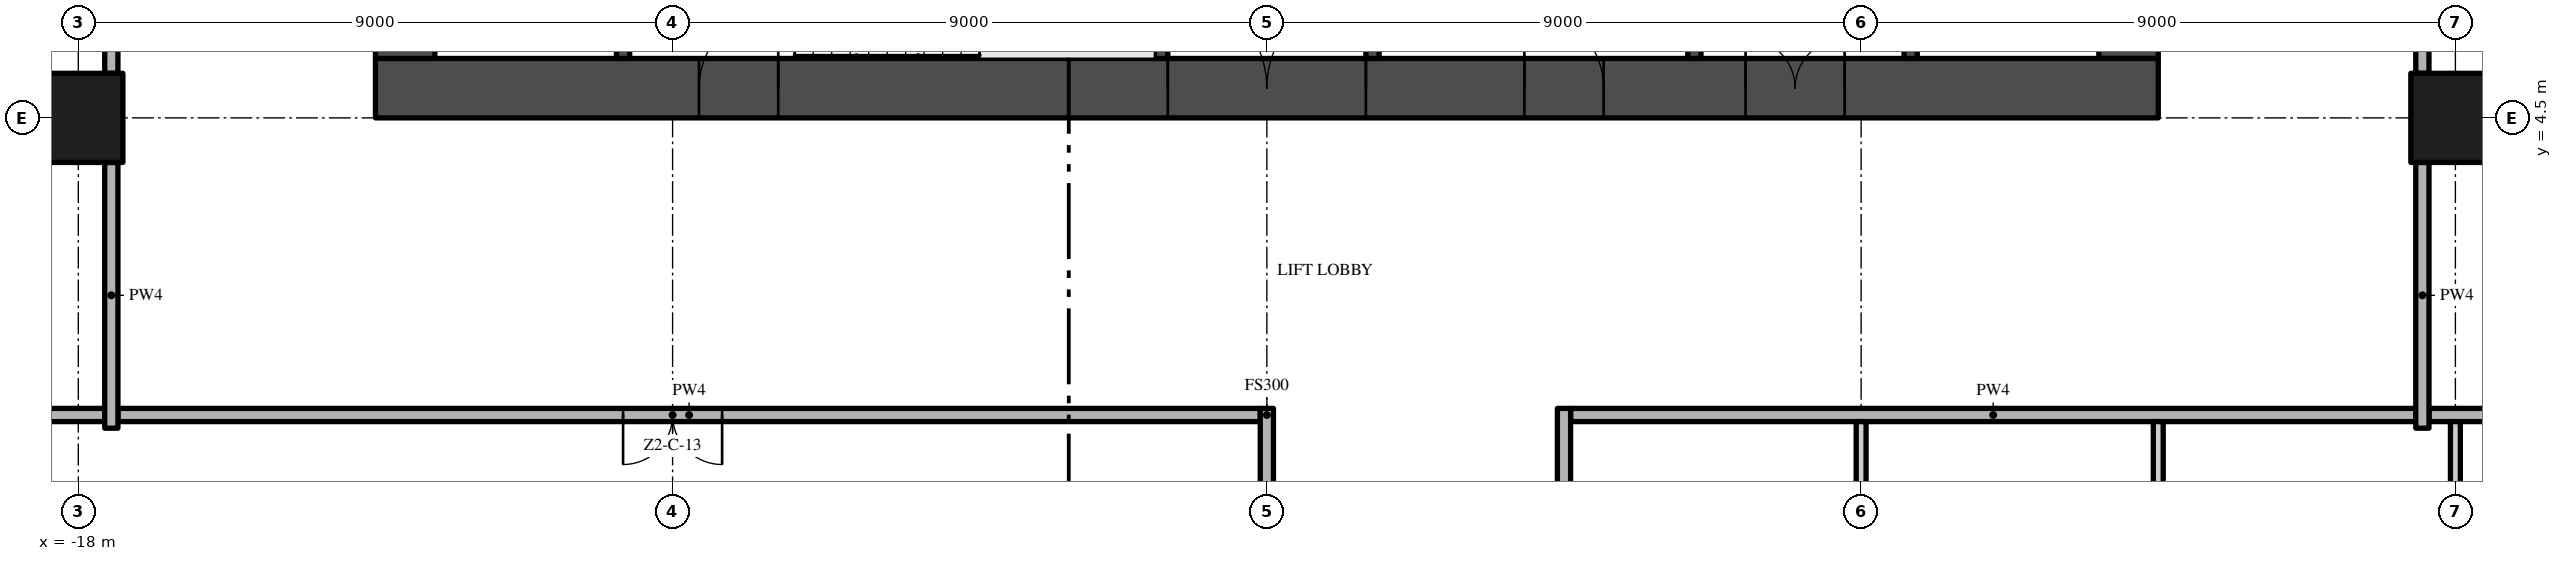
"""IFC4 building model, lengths in metres.
Left out: names, types, materials, properties, quantities, classifications, styles, units other than length and angle.
Written with IfcOpenShell. Run it as: python <this file> out.ifc"""

import sys

from ifc_helpers import new_model, si_unit, direction, frame, frame_2d, origin, origin_2d, place, context, subcontext, project, spatial, rectangle, extrude, element, fill, save


model = new_model("IFC4")
c1 = context("Model", 3, precision=1e-05, world=origin(), true_north=direction((0.0, 1.0)))
c2 = subcontext(c1, "Body", "Model", "MODEL_VIEW")
j1 = project(units=[si_unit("LENGTHUNIT", "METRE"), si_unit("PLANEANGLEUNIT", "RADIAN")], contexts=[c1])
p1 = place(None, origin())
s1 = spatial("IfcSite", under=j1, at=p1, CompositionType="ELEMENT")
p2 = place(p1, origin())
s2 = spatial("IfcBuilding", under=s1, at=p2, CompositionType="ELEMENT")
p3 = place(p2, frame((0.0, 0.0, 99.8)))
s3 = spatial("IfcBuildingStorey", under=s2, at=p3, CompositionType="ELEMENT", Elevation=99.8)
p4 = place(p3, frame((-13.5, 4.95, -0.3), z_axis=(0.0, 0.0, 1.0), x_axis=(1.0, 0.0, 0.0)))
e1 = element("IfcWall", 1, at=p4, inside=s3, PredefinedType="SHEAR", context=c2, shape_type="SweptSolid", body=[
    extrude(rectangle(XDim=27.0, YDim=0.9, at=frame_2d((13.5, 0.0))), origin(), (0.0, 0.0, 1.0), 3.8),
])
p5 = place(p4, frame((12.0, 0.0, 0.3)))
e2 = element("IfcOpeningElement", 2, at=p5, cuts=e1, PredefinedType="OPENING", context=c2, shape_type="SweptSolid", body=[
    extrude(rectangle(XDim=3.0, YDim=2.4, at=frame_2d((1.5, 1.2))), frame((0.0, 0.46, 0.0), z_axis=(0.0, -1.0, 0.0), x_axis=(1.0, 0.0, 0.0)), (0.0, 0.0, 1.0), 0.92),
])
p6 = place(p4, frame((4.9, 0.0, 0.3)))
e3 = element("IfcOpeningElement", 3, at=p6, cuts=e1, PredefinedType="OPENING", context=c2, shape_type="SweptSolid", body=[
    extrude(rectangle(XDim=1.2, YDim=2.2, at=frame_2d((0.6, 1.1))), frame((0.0, 0.46, 0.0), z_axis=(0.0, -1.0, 0.0), x_axis=(1.0, 0.0, 0.0)), (0.0, 0.0, 1.0), 0.92),
])
p7 = place(p4, frame((20.75, 0.0, 0.3)))
e4 = element("IfcOpeningElement", 4, at=p7, cuts=e1, PredefinedType="OPENING", context=c2, shape_type="SweptSolid", body=[
    extrude(rectangle(XDim=1.5, YDim=2.2, at=frame_2d((0.75, 1.1))), frame((0.0, 0.46, 0.0), z_axis=(0.0, -1.0, 0.0), x_axis=(1.0, 0.0, 0.0)), (0.0, 0.0, 1.0), 0.92),
])
p8 = place(p4, frame((17.4, 0.0, 0.3)))
e5 = element("IfcOpeningElement", 5, at=p8, cuts=e1, PredefinedType="OPENING", context=c2, shape_type="SweptSolid", body=[
    extrude(rectangle(XDim=1.2, YDim=2.2, at=frame_2d((0.6, 1.1))), frame((0.0, 0.46, 0.0), z_axis=(0.0, -1.0, 0.0), x_axis=(1.0, 0.0, 0.0)), (0.0, 0.0, 1.0), 0.92),
])
p9 = place(p3, frame((13.05, 5.4, -0.3), z_axis=(0.0, 0.0, 1.0), x_axis=(0.0, 1.0, 0.0)))
e6 = element("IfcWall", 6, at=p9, inside=s3, PredefinedType="SHEAR", context=c2, shape_type="SweptSolid", body=[
    extrude(rectangle(XDim=16.2, YDim=0.9, at=frame_2d((8.1, 0.0))), origin(), (0.0, 0.0, 1.0), 3.8),
])
p10 = place(p9, frame((6.0, 0.0, 0.3)))
e7 = element("IfcOpeningElement", 7, at=p10, cuts=e6, PredefinedType="OPENING", context=c2, shape_type="SweptSolid", body=[
    extrude(rectangle(XDim=1.2, YDim=2.2, at=frame_2d((0.6, 1.1))), frame((0.0, 0.46, 0.0), z_axis=(0.0, -1.0, 0.0), x_axis=(1.0, 0.0, 0.0)), (0.0, 0.0, 1.0), 0.92),
])
p11 = place(p3, frame((-13.05, 21.6, -0.3), z_axis=(0.0, 0.0, 1.0), x_axis=(0.0, -1.0, 0.0)))
e8 = element("IfcWall", 8, at=p11, inside=s3, PredefinedType="SHEAR", context=c2, shape_type="SweptSolid", body=[
    extrude(rectangle(XDim=16.2, YDim=0.9, at=frame_2d((8.1, 0.0))), origin(), (0.0, 0.0, 1.0), 3.8),
])
p12 = place(p11, frame((9.0, 0.0, 0.3)))
e9 = element("IfcOpeningElement", 9, at=p12, cuts=e8, PredefinedType="OPENING", context=c2, shape_type="SweptSolid", body=[
    extrude(rectangle(XDim=1.2, YDim=2.2, at=frame_2d((0.6, 1.1))), frame((0.0, 0.46, 0.0), z_axis=(0.0, -1.0, 0.0), x_axis=(1.0, 0.0, 0.0)), (0.0, 0.0, 1.0), 0.92),
])
for number, where, z_axis, x_axis in (
    (10, (-18.0, 4.5, 0.0), (0.0, 0.0, 1.0), (1.0, 0.0, 0.0)),
    (11, (18.0, 4.5, 0.0), (0.0, 0.0, 1.0), (1.0, 0.0, 0.0)),
):
    element("IfcColumn", number, at=place(p3, frame(where, z_axis=z_axis, x_axis=x_axis)), inside=s3, PredefinedType="COLUMN", context=c2, shape_type="SweptSolid", body=[
        extrude(rectangle(XDim=1.35, YDim=1.35, at=origin_2d()), origin(), (0.0, 0.0, 1.0), 3.5),
    ])
for number, where, z_axis, x_axis in (
    (12, (-9.75, 5.4, 0.0), (0.0, 0.0, 1.0), (0.0, 1.0, 0.0)),
    (13, (-1.6, 5.4, 0.0), (0.0, 0.0, 1.0), (0.0, 1.0, 0.0)),
):
    element("IfcWall", number, at=place(p3, frame(where, z_axis=z_axis, x_axis=x_axis)), inside=s3, PredefinedType="SHEAR", context=c2, shape_type="SweptSolid", body=[
        extrude(rectangle(XDim=2.55, YDim=0.2, at=frame_2d((1.275, 0.0))), origin(), (0.0, 0.0, 1.0), 3.5),
    ])
p13 = place(p3, frame((1.6, 11.5, 0.0), z_axis=(0.0, 0.0, 1.0), x_axis=(0.0, -1.0, 0.0)))
e14 = element("IfcWall", 14, at=p13, inside=s3, PredefinedType="SHEAR", context=c2, shape_type="SweptSolid", body=[
    extrude(rectangle(XDim=6.1, YDim=0.2, at=frame_2d((3.05, 0.0))), origin(), (0.0, 0.0, 1.0), 3.5),
])
p14 = place(p13, frame((2.2, 0.0, 0.0)))
e15 = element("IfcOpeningElement", 15, at=p14, cuts=e14, PredefinedType="OPENING", context=c2, shape_type="SweptSolid", body=[
    extrude(rectangle(XDim=0.9, YDim=2.1, at=frame_2d((0.45, 1.05))), frame((0.0, 0.11, 0.0), z_axis=(0.0, -1.0, 0.0), x_axis=(1.0, 0.0, 0.0)), (0.0, 0.0, 1.0), 0.22),
])
p15 = place(p3, frame((6.475, 5.4, 0.0), z_axis=(0.0, 0.0, 1.0), x_axis=(0.0, 1.0, 0.0)))
e16 = element("IfcWall", 16, at=p15, inside=s3, PredefinedType="SHEAR", context=c2, shape_type="SweptSolid", body=[
    extrude(rectangle(XDim=6.1, YDim=0.2, at=frame_2d((3.05, 0.0))), origin(), (0.0, 0.0, 1.0), 3.5),
])
p16 = place(p3, frame((9.75, 5.4, 0.0), z_axis=(0.0, 0.0, 1.0), x_axis=(0.0, 1.0, 0.0)))
e17 = element("IfcWall", 17, at=p16, inside=s3, PredefinedType="SHEAR", context=c2, shape_type="SweptSolid", body=[
    extrude(rectangle(XDim=2.2, YDim=0.2, at=frame_2d((1.1, 0.0))), origin(), (0.0, 0.0, 1.0), 3.5),
])
p17 = place(p16, frame((0.55, 0.0, 0.0)))
e18 = element("IfcOpeningElement", 18, at=p17, cuts=e17, PredefinedType="OPENING", context=c2, shape_type="SweptSolid", body=[
    extrude(rectangle(XDim=1.1, YDim=2.1, at=frame_2d((0.55, 1.05))), frame((0.0, 0.11, 0.0), z_axis=(0.0, -1.0, 0.0), x_axis=(1.0, 0.0, 0.0)), (0.0, 0.0, 1.0), 0.22),
])
p18 = place(p3, frame((-0.1, 0.0, 0.0), z_axis=(0.0, 0.0, 1.0), x_axis=(-1.0, 0.0, 0.0)))
e19 = element("IfcWall", 19, at=p18, inside=s3, PredefinedType="PARTITIONING", context=c2, shape_type="SweptSolid", body=[
    extrude(rectangle(XDim=17.3, YDim=0.2, at=frame_2d((8.65, 0.0))), origin(), (0.0, 0.0, 1.0), 3.5),
])
p19 = place(p18, frame((8.15, 0.0, 0.0)))
e20 = element("IfcOpeningElement", 20, at=p19, cuts=e19, PredefinedType="OPENING", context=c2, shape_type="SweptSolid", body=[
    extrude(rectangle(XDim=1.5, YDim=2.4, at=frame_2d((0.75, 1.2))), frame((0.0, 0.11, 0.0), z_axis=(0.0, -1.0, 0.0), x_axis=(1.0, 0.0, 0.0)), (0.0, 0.0, 1.0), 0.22),
])
p20 = place(p3, frame((4.6, 0.0, 0.0), z_axis=(0.0, 0.0, 1.0), x_axis=(1.0, 0.0, 0.0)))
e21 = element("IfcWall", 21, at=p20, inside=s3, PredefinedType="PARTITIONING", context=c2, shape_type="SweptSolid", body=[
    extrude(rectangle(XDim=12.8, YDim=0.2, at=frame_2d((6.4, 0.0))), origin(), (0.0, 0.0, 1.0), 3.5),
])
for number, where, z_axis, x_axis in (
    (22, (-26.7, 0.0, 0.0), (0.0, 0.0, 1.0), (1.0, 0.0, 0.0)),
    (23, (17.6, 0.0, 0.0), (0.0, 0.0, 1.0), (1.0, 0.0, 0.0)),
):
    element("IfcWall", number, at=place(p3, frame(where, z_axis=z_axis, x_axis=x_axis)), inside=s3, PredefinedType="PARTITIONING", context=c2, shape_type="SweptSolid", body=[
        extrude(rectangle(XDim=9.1, YDim=0.2, at=frame_2d((4.55, 0.0))), origin(), (0.0, 0.0, 1.0), 3.5),
    ])
p21 = place(p3, frame((-17.5, -0.2, 0.0), z_axis=(0.0, 0.0, 1.0), x_axis=(0.0, 1.0, 0.0)))
e24 = element("IfcWall", 24, at=p21, inside=s3, PredefinedType="PARTITIONING", context=c2, shape_type="SweptSolid", body=[
    extrude(rectangle(XDim=4.025, YDim=0.2, at=frame_2d((2.013, 0.0))), origin(), (0.0, 0.0, 1.0), 3.5),
])
p22 = place(p3, frame((-17.5, 5.175, 0.0), z_axis=(0.0, 0.0, 1.0), x_axis=(0.0, 1.0, 0.0)))
e25 = element("IfcWall", 25, at=p22, inside=s3, PredefinedType="PARTITIONING", context=c2, shape_type="SweptSolid", body=[
    extrude(rectangle(XDim=7.65, YDim=0.2, at=frame_2d((3.825, 0.0))), origin(), (0.0, 0.0, 1.0), 3.5),
])
p23 = place(p3, frame((0.0, -3.825, 0.0), z_axis=(0.0, 0.0, 1.0), x_axis=(0.0, 1.0, 0.0)))
e26 = element("IfcWall", 26, at=p23, inside=s3, PredefinedType="PARTITIONING", context=c2, shape_type="SweptSolid", body=[
    extrude(rectangle(XDim=3.925, YDim=0.2, at=frame_2d((1.962, 0.0))), origin(), (0.0, 0.0, 1.0), 3.5),
])
p24 = place(p3, frame((4.5, 0.1, 0.0), z_axis=(0.0, 0.0, 1.0), x_axis=(0.0, -1.0, 0.0)))
e27 = element("IfcWall", 27, at=p24, inside=s3, PredefinedType="PARTITIONING", context=c2, shape_type="SweptSolid", body=[
    extrude(rectangle(XDim=22.3, YDim=0.2, at=frame_2d((11.15, 0.0))), origin(), (0.0, 0.0, 1.0), 3.5),
])
p25 = place(p24, frame((10.6, 0.0, 0.0)))
e28 = element("IfcOpeningElement", 28, at=p25, cuts=e27, PredefinedType="OPENING", context=c2, shape_type="SweptSolid", body=[
    extrude(rectangle(XDim=1.5, YDim=2.4, at=frame_2d((0.75, 1.2))), frame((0.0, 0.11, 0.0), z_axis=(0.0, -1.0, 0.0), x_axis=(1.0, 0.0, 0.0)), (0.0, 0.0, 1.0), 0.22),
])
p26 = place(p3, frame((9.0, -0.1, 0.0), z_axis=(0.0, 0.0, 1.0), x_axis=(0.0, -1.0, 0.0)))
e29 = element("IfcWall", 29, at=p26, inside=s3, PredefinedType="PARTITIONING", context=c2, shape_type="SweptSolid", body=[
    extrude(rectangle(XDim=3.725, YDim=0.15, at=frame_2d((1.863, 0.0))), origin(), (0.0, 0.0, 1.0), 3.5),
])
p27 = place(p26, frame((2.375, 0.0, 0.0)))
e30 = element("IfcOpeningElement", 30, at=p27, cuts=e29, PredefinedType="OPENING", context=c2, shape_type="SweptSolid", body=[
    extrude(rectangle(XDim=1.0, YDim=2.4, at=frame_2d((0.5, 1.2))), frame((0.0, 0.085, 0.0), z_axis=(0.0, -1.0, 0.0), x_axis=(1.0, 0.0, 0.0)), (0.0, 0.0, 1.0), 0.17),
])
p28 = place(p3, frame((13.5, -8.325, 0.0), z_axis=(0.0, 0.0, 1.0), x_axis=(0.0, 1.0, 0.0)))
e31 = element("IfcWall", 31, at=p28, inside=s3, PredefinedType="PARTITIONING", context=c2, shape_type="SweptSolid", body=[
    extrude(rectangle(XDim=8.225, YDim=0.15, at=frame_2d((4.112, 0.0))), origin(), (0.0, 0.0, 1.0), 3.5),
])
p29 = place(p3, frame((17.5, -0.2, 0.0), z_axis=(0.0, 0.0, 1.0), x_axis=(0.0, 1.0, 0.0)))
e32 = element("IfcWall", 32, at=p29, inside=s3, PredefinedType="PARTITIONING", context=c2, shape_type="SweptSolid", body=[
    extrude(rectangle(XDim=4.025, YDim=0.2, at=frame_2d((2.013, 0.0))), origin(), (0.0, 0.0, 1.0), 3.5),
])
p30 = place(p3, frame((17.5, 12.825, 0.0), z_axis=(0.0, 0.0, 1.0), x_axis=(0.0, -1.0, 0.0)))
e33 = element("IfcWall", 33, at=p30, inside=s3, PredefinedType="PARTITIONING", context=c2, shape_type="SweptSolid", body=[
    extrude(rectangle(XDim=7.65, YDim=0.2, at=frame_2d((3.825, 0.0))), origin(), (0.0, 0.0, 1.0), 3.5),
])
p31 = place(p30, frame((5.5, 0.0, 0.0)))
e34 = element("IfcOpeningElement", 34, at=p31, cuts=e33, PredefinedType="OPENING", context=c2, shape_type="SweptSolid", body=[
    extrude(rectangle(XDim=1.2, YDim=2.4, at=frame_2d((0.6, 1.2))), frame((0.0, 0.11, 0.0), z_axis=(0.0, -1.0, 0.0), x_axis=(1.0, 0.0, 0.0)), (0.0, 0.0, 1.0), 0.22),
])
p32 = place(p3, frame((18.0, -3.825, 0.0), z_axis=(0.0, 0.0, 1.0), x_axis=(0.0, 1.0, 0.0)))
e35 = element("IfcWall", 35, at=p32, inside=s3, PredefinedType="PARTITIONING", context=c2, shape_type="SweptSolid", body=[
    extrude(rectangle(XDim=3.725, YDim=0.15, at=frame_2d((1.863, 0.0))), origin(), (0.0, 0.0, 1.0), 3.5),
])
p33 = place(p5, frame((3.0, 0.0, 0.0), z_axis=(0.0, 0.0, 1.0), x_axis=(-1.0, 0.0, 0.0)))
e36 = element("IfcDoor", 36, at=p33, inside=s3, OperationType="DOUBLE_DOOR_SINGLE_SWING", PredefinedType="DOOR", context=c2, shape_type="SweptSolid", body=[
    extrude(rectangle(XDim=3.0, YDim=2.4, at=frame_2d((1.5, 1.2))), frame((0.0, 0.025, 0.0), z_axis=(0.0, -1.0, 0.0), x_axis=(1.0, 0.0, 0.0)), (0.0, 0.0, 1.0), 0.05),
])
fill(e2, e36)
p34 = place(p6, frame((1.2, 0.0, 0.0), z_axis=(0.0, 0.0, 1.0), x_axis=(-1.0, 0.0, 0.0)))
e37 = element("IfcDoor", 37, at=p34, inside=s3, OperationType="SINGLE_SWING_LEFT", PredefinedType="DOOR", context=c2, shape_type="SweptSolid", body=[
    extrude(rectangle(XDim=1.2, YDim=2.2, at=frame_2d((0.6, 1.1))), frame((0.0, 0.025, 0.0), z_axis=(0.0, -1.0, 0.0), x_axis=(1.0, 0.0, 0.0)), (0.0, 0.0, 1.0), 0.05),
])
fill(e3, e37)
p35 = place(p7, frame((1.5, 0.0, 0.0), z_axis=(0.0, 0.0, 1.0), x_axis=(-1.0, 0.0, 0.0)))
e38 = element("IfcDoor", 38, at=p35, inside=s3, OperationType="DOUBLE_DOOR_SINGLE_SWING", PredefinedType="DOOR", context=c2, shape_type="SweptSolid", body=[
    extrude(rectangle(XDim=1.5, YDim=2.2, at=frame_2d((0.75, 1.1))), frame((0.0, 0.025, 0.0), z_axis=(0.0, -1.0, 0.0), x_axis=(1.0, 0.0, 0.0)), (0.0, 0.0, 1.0), 0.05),
])
fill(e4, e38)
p36 = place(p8, frame((1.2, 0.0, 0.0), z_axis=(0.0, 0.0, 1.0), x_axis=(-1.0, 0.0, 0.0)))
e39 = element("IfcDoor", 39, at=p36, inside=s3, OperationType="SINGLE_SWING_RIGHT", PredefinedType="DOOR", context=c2, shape_type="SweptSolid", body=[
    extrude(rectangle(XDim=1.2, YDim=2.2, at=frame_2d((0.6, 1.1))), frame((0.0, 0.025, 0.0), z_axis=(0.0, -1.0, 0.0), x_axis=(1.0, 0.0, 0.0)), (0.0, 0.0, 1.0), 0.05),
])
fill(e5, e39)
p37 = place(p19, origin())
e40 = element("IfcDoor", 40, at=p37, inside=s3, OperationType="DOUBLE_DOOR_SINGLE_SWING", PredefinedType="DOOR", context=c2, shape_type="SweptSolid", body=[
    extrude(rectangle(XDim=1.5, YDim=2.4, at=frame_2d((0.75, 1.2))), frame((0.0, 0.025, 0.0), z_axis=(0.0, -1.0, 0.0), x_axis=(1.0, 0.0, 0.0)), (0.0, 0.0, 1.0), 0.05),
])
fill(e20, e40)
save(model, sys.argv[1])
